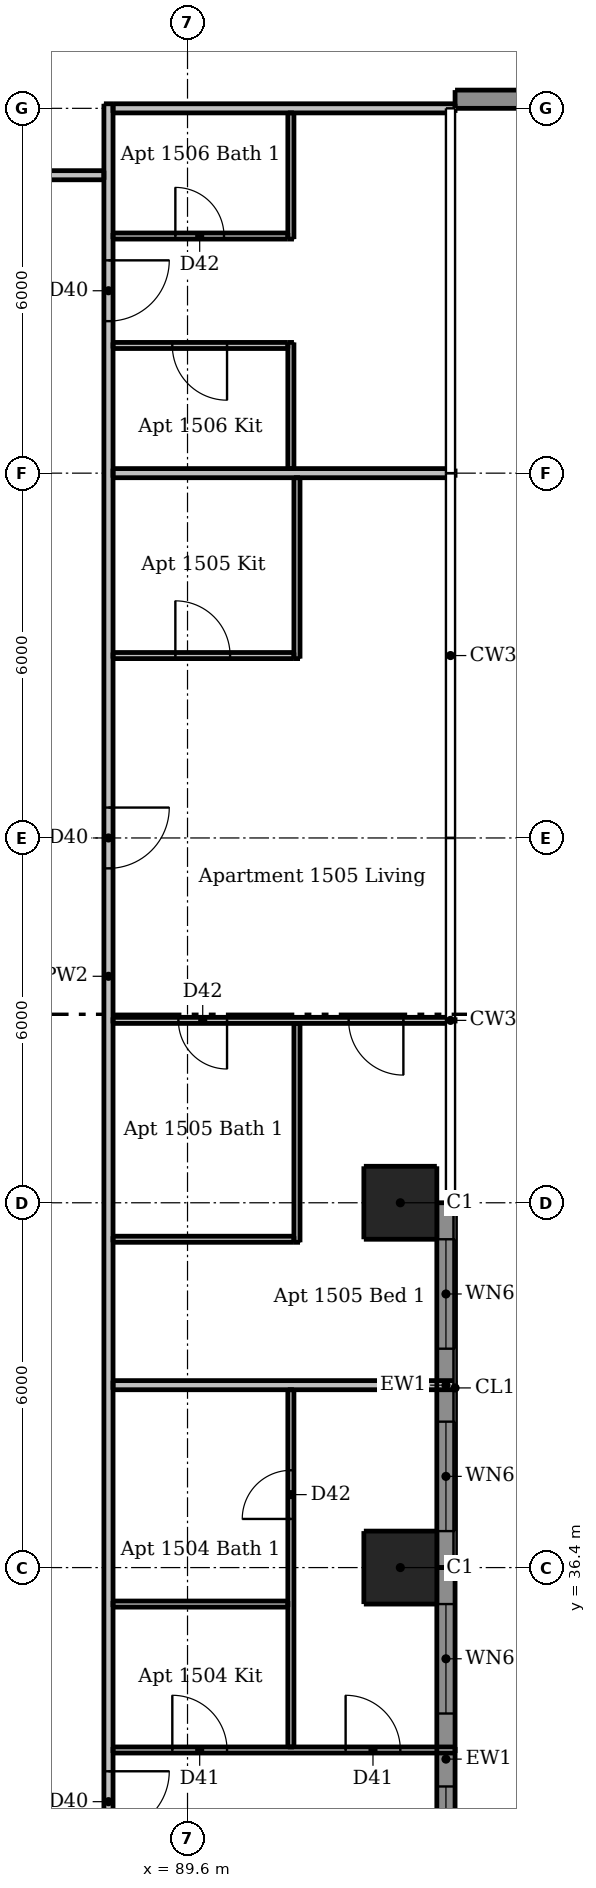
"""IFC4 building model, lengths in metres.
Left out: names, types, materials, properties, quantities, classifications, styles, units other than length and angle.
Written with IfcOpenShell. Run it as: python <this file> out.ifc"""

import sys

from ifc_helpers import new_model, si_unit, direction, frame, frame_2d, origin, origin_2d, place, context, subcontext, project, spatial, rectangle, extrude, element, fill, save


model = new_model("IFC4")
c1 = context("Model", 3, precision=1e-05, world=origin(), true_north=direction((0.0, 1.0)))
c2 = subcontext(c1, "Body", "Model", "MODEL_VIEW")
j1 = project(units=[si_unit("LENGTHUNIT", "METRE"), si_unit("PLANEANGLEUNIT", "RADIAN")], contexts=[c1])
p1 = place(None, origin())
s1 = spatial("IfcSite", under=j1, at=p1, CompositionType="ELEMENT")
p2 = place(p1, origin())
s2 = spatial("IfcBuilding", under=s1, at=p2, CompositionType="ELEMENT")
p3 = place(p2, frame((0.0, 0.0, 56.5)))
s3 = spatial("IfcBuildingStorey", under=s2, at=p3, CompositionType="ELEMENT", Elevation=56.5)
for number, where, z_axis, x_axis in (
    (1, (93.1, 36.4, 0.0), (0.0, 0.0, 1.0), (1.0, 0.0, 0.0)),
    (2, (93.1, 42.4, 0.0), (0.0, 0.0, 1.0), (1.0, 0.0, 0.0)),
):
    element("IfcColumn", number, at=place(p3, frame(where, z_axis=z_axis, x_axis=x_axis)), inside=s3, PredefinedType="COLUMN", context=c2, shape_type="SweptSolid", body=[
        extrude(rectangle(XDim=1.2, YDim=1.2, at=origin_2d()), origin(), (0.0, 0.0, 1.0), 3.05),
    ])
p4 = place(p3, frame((94.0, 60.55, 0.0), z_axis=(0.0, 0.0, 1.0), x_axis=(1.0, 0.0, 0.0)))
e3 = element("IfcWall", 3, at=p4, inside=s3, PredefinedType="SOLIDWALL", context=c2, shape_type="SweptSolid", body=[
    extrude(rectangle(XDim=4.5, YDim=0.3, at=frame_2d((2.25, 0.0))), origin(), (0.0, 0.0, 1.0), 3.05),
])
p5 = place(p4, frame((1.05, 0.0, 0.15)))
e4 = element("IfcOpeningElement", 4, at=p5, cuts=e3, PredefinedType="OPENING", context=c2, shape_type="SweptSolid", body=[
    extrude(rectangle(XDim=2.4, YDim=2.1, at=frame_2d((1.2, 1.05))), frame((0.0, 0.16, 0.0), z_axis=(0.0, -1.0, 0.0), x_axis=(1.0, 0.0, 0.0)), (0.0, 0.0, 1.0), 0.32),
])
p6 = place(p3, frame((93.85, 30.1, 0.0), z_axis=(0.0, 0.0, 1.0), x_axis=(0.0, 1.0, 0.0)))
e5 = element("IfcWall", 5, at=p6, inside=s3, PredefinedType="SOLIDWALL", context=c2, shape_type="SweptSolid", body=[
    extrude(rectangle(XDim=6.3, YDim=0.3, at=frame_2d((3.15, 0.0))), origin(), (0.0, 0.0, 1.0), 3.05),
])
p7 = place(p6, frame((0.9, 0.0, 0.15)))
e6 = element("IfcOpeningElement", 6, at=p7, cuts=e5, PredefinedType="OPENING", context=c2, shape_type="SweptSolid", body=[
    extrude(rectangle(XDim=1.8, YDim=2.1, at=frame_2d((0.9, 1.05))), frame((0.0, 0.16, 0.0), z_axis=(0.0, -1.0, 0.0), x_axis=(1.0, 0.0, 0.0)), (0.0, 0.0, 1.0), 0.32),
])
p8 = place(p6, frame((3.9, 0.0, 0.15)))
e7 = element("IfcOpeningElement", 7, at=p8, cuts=e5, PredefinedType="OPENING", context=c2, shape_type="SweptSolid", body=[
    extrude(rectangle(XDim=1.8, YDim=2.1, at=frame_2d((0.9, 1.05))), frame((0.0, 0.16, 0.0), z_axis=(0.0, -1.0, 0.0), x_axis=(1.0, 0.0, 0.0)), (0.0, 0.0, 1.0), 0.32),
])
p9 = place(p3, frame((93.85, 36.4, 0.0), z_axis=(0.0, 0.0, 1.0), x_axis=(0.0, 1.0, 0.0)))
e8 = element("IfcWall", 8, at=p9, inside=s3, PredefinedType="SOLIDWALL", context=c2, shape_type="SweptSolid", body=[
    extrude(rectangle(XDim=6.0, YDim=0.3, at=frame_2d((3.0, 0.0))), origin(), (0.0, 0.0, 1.0), 3.05),
])
p10 = place(p9, frame((0.6, 0.0, 0.15)))
e9 = element("IfcOpeningElement", 9, at=p10, cuts=e8, PredefinedType="OPENING", context=c2, shape_type="SweptSolid", body=[
    extrude(rectangle(XDim=1.8, YDim=2.1, at=frame_2d((0.9, 1.05))), frame((0.0, 0.16, 0.0), z_axis=(0.0, -1.0, 0.0), x_axis=(1.0, 0.0, 0.0)), (0.0, 0.0, 1.0), 0.32),
])
p11 = place(p9, frame((3.6, 0.0, 0.15)))
e10 = element("IfcOpeningElement", 10, at=p11, cuts=e8, PredefinedType="OPENING", context=c2, shape_type="SweptSolid", body=[
    extrude(rectangle(XDim=1.8, YDim=2.1, at=frame_2d((0.9, 1.05))), frame((0.0, 0.16, 0.0), z_axis=(0.0, -1.0, 0.0), x_axis=(1.0, 0.0, 0.0)), (0.0, 0.0, 1.0), 0.32),
])
p12 = place(p3, frame((91.3, 33.45, 0.0), z_axis=(0.0, 0.0, 1.0), x_axis=(0.0, 1.0, 0.0)))
e11 = element("IfcWall", 11, at=p12, inside=s3, PredefinedType="PARTITIONING", context=c2, shape_type="SweptSolid", body=[
    extrude(rectangle(XDim=5.875, YDim=0.1, at=frame_2d((2.938, 0.0))), origin(), (0.0, 0.0, 1.0), 3.05),
])
p13 = place(p12, frame((3.75, 0.0, 0.0)))
e12 = element("IfcOpeningElement", 12, at=p13, cuts=e11, PredefinedType="OPENING", context=c2, shape_type="SweptSolid", body=[
    extrude(rectangle(XDim=0.8, YDim=2.1, at=frame_2d((0.4, 1.05))), frame((0.0, 0.06, 0.0), z_axis=(0.0, -1.0, 0.0), x_axis=(1.0, 0.0, 0.0)), (0.0, 0.0, 1.0), 0.12),
])
for number, where, z_axis, x_axis in (
    (13, (91.3, 54.475, 0.0), (0.0, 0.0, 1.0), (0.0, 1.0, 0.0)),
    (14, (91.3, 58.25, 0.0), (0.0, 0.0, 1.0), (0.0, 1.0, 0.0)),
):
    element("IfcWall", number, at=place(p3, frame(where, z_axis=z_axis, x_axis=x_axis)), inside=s3, PredefinedType="PARTITIONING", context=c2, shape_type="SweptSolid", body=[
        extrude(rectangle(XDim=2.075, YDim=0.1, at=frame_2d((1.038, 0.0))), origin(), (0.0, 0.0, 1.0), 3.05),
    ])
p14 = place(p3, frame((91.4, 41.75, 0.0), z_axis=(0.0, 0.0, 1.0), x_axis=(0.0, 1.0, 0.0)))
e15 = element("IfcWall", 15, at=p14, inside=s3, PredefinedType="PARTITIONING", context=c2, shape_type="SweptSolid", body=[
    extrude(rectangle(XDim=3.6, YDim=0.1, at=frame_2d((1.8, 0.0))), origin(), (0.0, 0.0, 1.0), 3.05),
])
p15 = place(p3, frame((91.4, 51.35, 0.0), z_axis=(0.0, 0.0, 1.0), x_axis=(0.0, 1.0, 0.0)))
e16 = element("IfcWall", 16, at=p15, inside=s3, PredefinedType="PARTITIONING", context=c2, shape_type="SweptSolid", body=[
    extrude(rectangle(XDim=2.975, YDim=0.1, at=frame_2d((1.487, 0.0))), origin(), (0.0, 0.0, 1.0), 3.05),
])
p16 = place(p3, frame((88.375, 58.3, 0.0), z_axis=(0.0, 0.0, 1.0), x_axis=(1.0, 0.0, 0.0)))
e17 = element("IfcWall", 17, at=p16, inside=s3, PredefinedType="PARTITIONING", context=c2, shape_type="SweptSolid", body=[
    extrude(rectangle(XDim=2.875, YDim=0.1, at=frame_2d((1.438, 0.0))), origin(), (0.0, 0.0, 1.0), 3.05),
])
p17 = place(p16, frame((1.025, 0.0, 0.0)))
e18 = element("IfcOpeningElement", 18, at=p17, cuts=e17, PredefinedType="OPENING", context=c2, shape_type="SweptSolid", body=[
    extrude(rectangle(XDim=0.8, YDim=2.1, at=frame_2d((0.4, 1.05))), frame((0.0, 0.06, 0.0), z_axis=(0.0, -1.0, 0.0), x_axis=(1.0, 0.0, 0.0)), (0.0, 0.0, 1.0), 0.12),
])
p18 = place(p3, frame((91.25, 56.5, 0.0), z_axis=(0.0, 0.0, 1.0), x_axis=(-1.0, 0.0, 0.0)))
e19 = element("IfcWall", 19, at=p18, inside=s3, PredefinedType="PARTITIONING", context=c2, shape_type="SweptSolid", body=[
    extrude(rectangle(XDim=2.875, YDim=0.1, at=frame_2d((1.438, 0.0))), origin(), (0.0, 0.0, 1.0), 3.05),
])
p19 = place(p18, frame((1.0, 0.0, 0.0)))
e20 = element("IfcOpeningElement", 20, at=p19, cuts=e19, PredefinedType="OPENING", context=c2, shape_type="SweptSolid", body=[
    extrude(rectangle(XDim=0.9, YDim=2.1, at=frame_2d((0.45, 1.05))), frame((0.0, 0.06, 0.0), z_axis=(0.0, -1.0, 0.0), x_axis=(1.0, 0.0, 0.0)), (0.0, 0.0, 1.0), 0.12),
])
p20 = place(p3, frame((88.375, 51.4, 0.0), z_axis=(0.0, 0.0, 1.0), x_axis=(1.0, 0.0, 0.0)))
e21 = element("IfcWall", 21, at=p20, inside=s3, PredefinedType="PARTITIONING", context=c2, shape_type="SweptSolid", body=[
    extrude(rectangle(XDim=2.975, YDim=0.1, at=frame_2d((1.488, 0.0))), origin(), (0.0, 0.0, 1.0), 3.05),
])
p21 = place(p20, frame((1.025, 0.0, 0.0)))
e22 = element("IfcOpeningElement", 22, at=p21, cuts=e21, PredefinedType="OPENING", context=c2, shape_type="SweptSolid", body=[
    extrude(rectangle(XDim=0.9, YDim=2.1, at=frame_2d((0.45, 1.05))), frame((0.0, 0.06, 0.0), z_axis=(0.0, -1.0, 0.0), x_axis=(1.0, 0.0, 0.0)), (0.0, 0.0, 1.0), 0.12),
])
p22 = place(p3, frame((94.0, 45.4, 0.0), z_axis=(0.0, 0.0, 1.0), x_axis=(-1.0, 0.0, 0.0)))
e23 = element("IfcWall", 23, at=p22, inside=s3, PredefinedType="PARTITIONING", context=c2, shape_type="SweptSolid", body=[
    extrude(rectangle(XDim=5.625, YDim=0.1, at=frame_2d((2.812, 0.0))), origin(), (0.0, 0.0, 1.0), 3.05),
])
p23 = place(p22, frame((0.85, 0.0, 0.0)))
e24 = element("IfcOpeningElement", 24, at=p23, cuts=e23, PredefinedType="OPENING", context=c2, shape_type="SweptSolid", body=[
    extrude(rectangle(XDim=0.9, YDim=2.1, at=frame_2d((0.45, 1.05))), frame((0.0, 0.06, 0.0), z_axis=(0.0, -1.0, 0.0), x_axis=(1.0, 0.0, 0.0)), (0.0, 0.0, 1.0), 0.12),
])
p24 = place(p22, frame((3.75, 0.0, 0.0)))
e25 = element("IfcOpeningElement", 25, at=p24, cuts=e23, PredefinedType="OPENING", context=c2, shape_type="SweptSolid", body=[
    extrude(rectangle(XDim=0.8, YDim=2.1, at=frame_2d((0.4, 1.05))), frame((0.0, 0.06, 0.0), z_axis=(0.0, -1.0, 0.0), x_axis=(1.0, 0.0, 0.0)), (0.0, 0.0, 1.0), 0.12),
])
p25 = place(p3, frame((88.375, 41.8, 0.0), z_axis=(0.0, 0.0, 1.0), x_axis=(1.0, 0.0, 0.0)))
e26 = element("IfcWall", 26, at=p25, inside=s3, PredefinedType="PARTITIONING", context=c2, shape_type="SweptSolid", body=[
    extrude(rectangle(XDim=2.975, YDim=0.1, at=frame_2d((1.488, 0.0))), origin(), (0.0, 0.0, 1.0), 3.05),
])
p26 = place(p3, frame((88.375, 35.8, 0.0), z_axis=(0.0, 0.0, 1.0), x_axis=(1.0, 0.0, 0.0)))
e27 = element("IfcWall", 27, at=p26, inside=s3, PredefinedType="PARTITIONING", context=c2, shape_type="SweptSolid", body=[
    extrude(rectangle(XDim=2.875, YDim=0.1, at=frame_2d((1.438, 0.0))), origin(), (0.0, 0.0, 1.0), 3.05),
])
p27 = place(p3, frame((88.375, 33.4, 0.0), z_axis=(0.0, 0.0, 1.0), x_axis=(1.0, 0.0, 0.0)))
e28 = element("IfcWall", 28, at=p27, inside=s3, PredefinedType="PARTITIONING", context=c2, shape_type="SweptSolid", body=[
    extrude(rectangle(XDim=5.625, YDim=0.1, at=frame_2d((2.812, 0.0))), origin(), (0.0, 0.0, 1.0), 3.05),
])
p28 = place(p27, frame((0.975, 0.0, 0.0)))
e29 = element("IfcOpeningElement", 29, at=p28, cuts=e28, PredefinedType="OPENING", context=c2, shape_type="SweptSolid", body=[
    extrude(rectangle(XDim=0.9, YDim=2.1, at=frame_2d((0.45, 1.05))), frame((0.0, 0.06, 0.0), z_axis=(0.0, -1.0, 0.0), x_axis=(1.0, 0.0, 0.0)), (0.0, 0.0, 1.0), 0.12),
])
p29 = place(p27, frame((3.825, 0.0, 0.0)))
e30 = element("IfcOpeningElement", 30, at=p29, cuts=e28, PredefinedType="OPENING", context=c2, shape_type="SweptSolid", body=[
    extrude(rectangle(XDim=0.9, YDim=2.1, at=frame_2d((0.45, 1.05))), frame((0.0, 0.06, 0.0), z_axis=(0.0, -1.0, 0.0), x_axis=(1.0, 0.0, 0.0)), (0.0, 0.0, 1.0), 0.12),
])
p30 = place(p3, frame((88.3, 60.475, 0.0), z_axis=(0.0, 0.0, 1.0), x_axis=(0.0, -1.0, 0.0)))
e31 = element("IfcWall", 31, at=p30, inside=s3, PredefinedType="PARTITIONING", context=c2, shape_type="SweptSolid", body=[
    extrude(rectangle(XDim=28.7, YDim=0.15, at=frame_2d((14.35, 0.0))), origin(), (0.0, 0.0, 1.0), 3.05),
])
p31 = place(p30, frame((27.425, 0.0, 0.0)))
e32 = element("IfcOpeningElement", 32, at=p31, cuts=e31, PredefinedType="OPENING", context=c2, shape_type="SweptSolid", body=[
    extrude(rectangle(XDim=1.0, YDim=2.1, at=frame_2d((0.5, 1.05))), frame((0.0, 0.085, 0.0), z_axis=(0.0, -1.0, 0.0), x_axis=(1.0, 0.0, 0.0)), (0.0, 0.0, 1.0), 0.17),
])
p32 = place(p30, frame((11.575, 0.0, 0.0)))
e33 = element("IfcOpeningElement", 33, at=p32, cuts=e31, PredefinedType="OPENING", context=c2, shape_type="SweptSolid", body=[
    extrude(rectangle(XDim=1.0, YDim=2.1, at=frame_2d((0.5, 1.05))), frame((0.0, 0.085, 0.0), z_axis=(0.0, -1.0, 0.0), x_axis=(1.0, 0.0, 0.0)), (0.0, 0.0, 1.0), 0.17),
])
p33 = place(p30, frame((2.575, 0.0, 0.0)))
e34 = element("IfcOpeningElement", 34, at=p33, cuts=e31, PredefinedType="OPENING", context=c2, shape_type="SweptSolid", body=[
    extrude(rectangle(XDim=1.0, YDim=2.1, at=frame_2d((0.5, 1.05))), frame((0.0, 0.085, 0.0), z_axis=(0.0, -1.0, 0.0), x_axis=(1.0, 0.0, 0.0)), (0.0, 0.0, 1.0), 0.17),
])
p34 = place(p3, frame((88.375, 60.4, 0.0), z_axis=(0.0, 0.0, 1.0), x_axis=(1.0, 0.0, 0.0)))
e35 = element("IfcWall", 35, at=p34, inside=s3, PredefinedType="PARTITIONING", context=c2, shape_type="SweptSolid", body=[
    extrude(rectangle(XDim=5.625, YDim=0.15, at=frame_2d((2.812, 0.0))), origin(), (0.0, 0.0, 1.0), 2.516),
])
p35 = place(p3, frame((59.675, 59.3, 0.0), z_axis=(0.0, 0.0, 1.0), x_axis=(1.0, 0.0, 0.0)))
e36 = element("IfcWall", 36, at=p35, inside=s3, PredefinedType="PARTITIONING", context=c2, shape_type="SweptSolid", body=[
    extrude(rectangle(XDim=28.55, YDim=0.15, at=frame_2d((14.275, 0.0))), origin(), (0.0, 0.0, 1.0), 3.05),
])
p36 = place(p35, frame((6.925, 0.0, 0.0)))
e37 = element("IfcOpeningElement", 37, at=p36, cuts=e36, PredefinedType="OPENING", context=c2, shape_type="SweptSolid", body=[
    extrude(rectangle(XDim=1.0, YDim=2.1, at=frame_2d((0.5, 1.05))), frame((0.0, 0.085, 0.0), z_axis=(0.0, -1.0, 0.0), x_axis=(1.0, 0.0, 0.0)), (0.0, 0.0, 1.0), 0.17),
])
p37 = place(p35, frame((25.775, 0.0, 0.0)))
e38 = element("IfcOpeningElement", 38, at=p37, cuts=e36, PredefinedType="OPENING", context=c2, shape_type="SweptSolid", body=[
    extrude(rectangle(XDim=1.0, YDim=2.1, at=frame_2d((0.5, 1.05))), frame((0.0, 0.085, 0.0), z_axis=(0.0, -1.0, 0.0), x_axis=(1.0, 0.0, 0.0)), (0.0, 0.0, 1.0), 0.17),
])
p38 = place(p3, frame((88.375, 54.4, 0.0), z_axis=(0.0, 0.0, 1.0), x_axis=(1.0, 0.0, 0.0)))
e39 = element("IfcWall", 39, at=p38, inside=s3, PredefinedType="PARTITIONING", context=c2, shape_type="SweptSolid", body=[
    extrude(rectangle(XDim=5.625, YDim=0.15, at=frame_2d((2.812, 0.0))), origin(), (0.0, 0.0, 1.0), 2.516),
])
p39 = place(p3, frame((88.375, 39.4, 0.0), z_axis=(0.0, 0.0, 1.0), x_axis=(1.0, 0.0, 0.0)))
e40 = element("IfcWall", 40, at=p39, inside=s3, PredefinedType="PARTITIONING", context=c2, shape_type="SweptSolid", body=[
    extrude(rectangle(XDim=5.625, YDim=0.15, at=frame_2d((2.812, 0.0))), origin(), (0.0, 0.0, 1.0), 3.05),
])
p40 = place(p7, origin())
e41 = element("IfcWindow", 41, at=p40, inside=s3, PartitioningType="DOUBLE_PANEL_VERTICAL", PredefinedType="WINDOW", context=c2, shape_type="SweptSolid", body=[
    extrude(rectangle(XDim=1.8, YDim=2.1, at=frame_2d((0.9, 1.05))), frame((0.0, 0.03, 0.0), z_axis=(0.0, -1.0, 0.0), x_axis=(1.0, 0.0, 0.0)), (0.0, 0.0, 1.0), 0.06),
])
fill(e6, e41)
p41 = place(p8, origin())
e42 = element("IfcWindow", 42, at=p41, inside=s3, PartitioningType="DOUBLE_PANEL_VERTICAL", PredefinedType="WINDOW", context=c2, shape_type="SweptSolid", body=[
    extrude(rectangle(XDim=1.8, YDim=2.1, at=frame_2d((0.9, 1.05))), frame((0.0, 0.03, 0.0), z_axis=(0.0, -1.0, 0.0), x_axis=(1.0, 0.0, 0.0)), (0.0, 0.0, 1.0), 0.06),
])
fill(e7, e42)
p42 = place(p10, origin())
e43 = element("IfcWindow", 43, at=p42, inside=s3, PartitioningType="DOUBLE_PANEL_VERTICAL", PredefinedType="WINDOW", context=c2, shape_type="SweptSolid", body=[
    extrude(rectangle(XDim=1.8, YDim=2.1, at=frame_2d((0.9, 1.05))), frame((0.0, 0.03, 0.0), z_axis=(0.0, -1.0, 0.0), x_axis=(1.0, 0.0, 0.0)), (0.0, 0.0, 1.0), 0.06),
])
fill(e9, e43)
p43 = place(p11, origin())
e44 = element("IfcWindow", 44, at=p43, inside=s3, PartitioningType="DOUBLE_PANEL_VERTICAL", PredefinedType="WINDOW", context=c2, shape_type="SweptSolid", body=[
    extrude(rectangle(XDim=1.8, YDim=2.1, at=frame_2d((0.9, 1.05))), frame((0.0, 0.03, 0.0), z_axis=(0.0, -1.0, 0.0), x_axis=(1.0, 0.0, 0.0)), (0.0, 0.0, 1.0), 0.06),
])
fill(e10, e44)
p44 = place(p31, origin())
e45 = element("IfcDoor", 45, at=p44, inside=s3, OperationType="SINGLE_SWING_LEFT", PredefinedType="DOOR", context=c2, shape_type="SweptSolid", body=[
    extrude(rectangle(XDim=1.0, YDim=2.1, at=frame_2d((0.5, 1.05))), frame((0.0, 0.025, 0.0), z_axis=(0.0, -1.0, 0.0), x_axis=(1.0, 0.0, 0.0)), (0.0, 0.0, 1.0), 0.05),
])
fill(e32, e45)
p45 = place(p28, origin())
e46 = element("IfcDoor", 46, at=p45, inside=s3, OperationType="SINGLE_SWING_LEFT", PredefinedType="DOOR", context=c2, shape_type="SweptSolid", body=[
    extrude(rectangle(XDim=0.9, YDim=2.1, at=frame_2d((0.45, 1.05))), frame((0.0, 0.025, 0.0), z_axis=(0.0, -1.0, 0.0), x_axis=(1.0, 0.0, 0.0)), (0.0, 0.0, 1.0), 0.05),
])
fill(e29, e46)
p46 = place(p29, origin())
e47 = element("IfcDoor", 47, at=p46, inside=s3, OperationType="SINGLE_SWING_LEFT", PredefinedType="DOOR", context=c2, shape_type="SweptSolid", body=[
    extrude(rectangle(XDim=0.9, YDim=2.1, at=frame_2d((0.45, 1.05))), frame((0.0, 0.025, 0.0), z_axis=(0.0, -1.0, 0.0), x_axis=(1.0, 0.0, 0.0)), (0.0, 0.0, 1.0), 0.05),
])
fill(e30, e47)
p47 = place(p13, origin())
e48 = element("IfcDoor", 48, at=p47, inside=s3, OperationType="SINGLE_SWING_LEFT", PredefinedType="DOOR", context=c2, shape_type="SweptSolid", body=[
    extrude(rectangle(XDim=0.8, YDim=2.1, at=frame_2d((0.4, 1.05))), frame((0.0, 0.025, 0.0), z_axis=(0.0, -1.0, 0.0), x_axis=(1.0, 0.0, 0.0)), (0.0, 0.0, 1.0), 0.05),
])
fill(e12, e48)
p48 = place(p32, origin())
e49 = element("IfcDoor", 49, at=p48, inside=s3, OperationType="SINGLE_SWING_LEFT", PredefinedType="DOOR", context=c2, shape_type="SweptSolid", body=[
    extrude(rectangle(XDim=1.0, YDim=2.1, at=frame_2d((0.5, 1.05))), frame((0.0, 0.025, 0.0), z_axis=(0.0, -1.0, 0.0), x_axis=(1.0, 0.0, 0.0)), (0.0, 0.0, 1.0), 0.05),
])
fill(e33, e49)
p49 = place(p21, origin())
e50 = element("IfcDoor", 50, at=p49, inside=s3, OperationType="SINGLE_SWING_LEFT", PredefinedType="DOOR", context=c2, shape_type="SweptSolid", body=[
    extrude(rectangle(XDim=0.9, YDim=2.1, at=frame_2d((0.45, 1.05))), frame((0.0, 0.025, 0.0), z_axis=(0.0, -1.0, 0.0), x_axis=(1.0, 0.0, 0.0)), (0.0, 0.0, 1.0), 0.05),
])
fill(e22, e50)
p50 = place(p23, origin())
e51 = element("IfcDoor", 51, at=p50, inside=s3, OperationType="SINGLE_SWING_LEFT", PredefinedType="DOOR", context=c2, shape_type="SweptSolid", body=[
    extrude(rectangle(XDim=0.9, YDim=2.1, at=frame_2d((0.45, 1.05))), frame((0.0, 0.025, 0.0), z_axis=(0.0, -1.0, 0.0), x_axis=(1.0, 0.0, 0.0)), (0.0, 0.0, 1.0), 0.05),
])
fill(e24, e51)
p51 = place(p24, origin())
e52 = element("IfcDoor", 52, at=p51, inside=s3, OperationType="SINGLE_SWING_LEFT", PredefinedType="DOOR", context=c2, shape_type="SweptSolid", body=[
    extrude(rectangle(XDim=0.8, YDim=2.1, at=frame_2d((0.4, 1.05))), frame((0.0, 0.025, 0.0), z_axis=(0.0, -1.0, 0.0), x_axis=(1.0, 0.0, 0.0)), (0.0, 0.0, 1.0), 0.05),
])
fill(e25, e52)
p52 = place(p33, origin())
e53 = element("IfcDoor", 53, at=p52, inside=s3, OperationType="SINGLE_SWING_LEFT", PredefinedType="DOOR", context=c2, shape_type="SweptSolid", body=[
    extrude(rectangle(XDim=1.0, YDim=2.1, at=frame_2d((0.5, 1.05))), frame((0.0, 0.025, 0.0), z_axis=(0.0, -1.0, 0.0), x_axis=(1.0, 0.0, 0.0)), (0.0, 0.0, 1.0), 0.05),
])
fill(e34, e53)
p53 = place(p19, origin())
e54 = element("IfcDoor", 54, at=p53, inside=s3, OperationType="SINGLE_SWING_LEFT", PredefinedType="DOOR", context=c2, shape_type="SweptSolid", body=[
    extrude(rectangle(XDim=0.9, YDim=2.1, at=frame_2d((0.45, 1.05))), frame((0.0, 0.025, 0.0), z_axis=(0.0, -1.0, 0.0), x_axis=(1.0, 0.0, 0.0)), (0.0, 0.0, 1.0), 0.05),
])
fill(e20, e54)
p54 = place(p17, origin())
e55 = element("IfcDoor", 55, at=p54, inside=s3, OperationType="SINGLE_SWING_LEFT", PredefinedType="DOOR", context=c2, shape_type="SweptSolid", body=[
    extrude(rectangle(XDim=0.8, YDim=2.1, at=frame_2d((0.4, 1.05))), frame((0.0, 0.025, 0.0), z_axis=(0.0, -1.0, 0.0), x_axis=(1.0, 0.0, 0.0)), (0.0, 0.0, 1.0), 0.05),
])
fill(e18, e55)
save(model, sys.argv[1])
